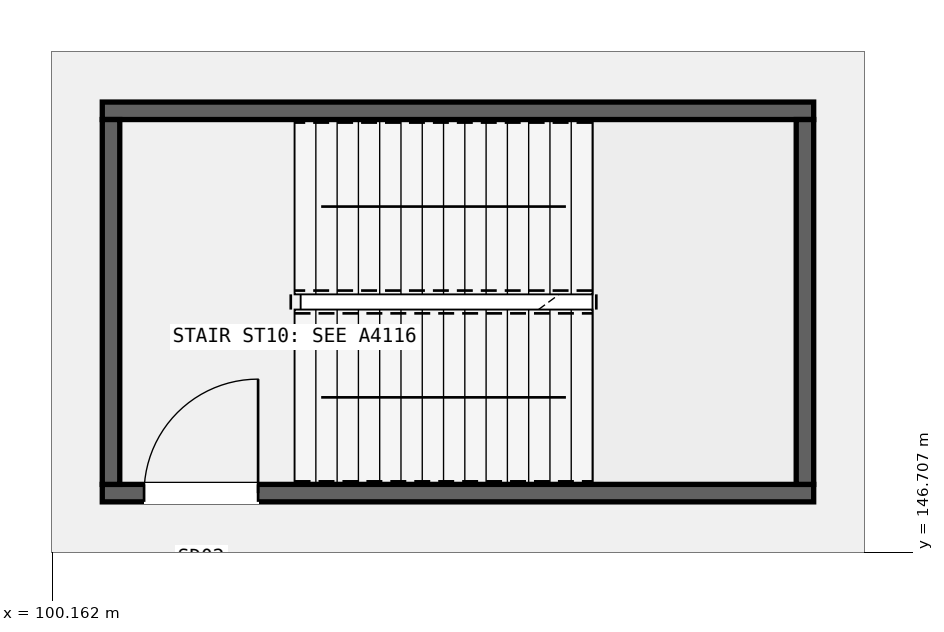
"""IFC4 building model, lengths in metres.
Left out: names, types, materials, properties, quantities, classifications, styles, units other than length and angle.
Written with IfcOpenShell. Run it as: python <this file> out.ifc"""

import sys

from ifc_helpers import new_model, si_unit, direction, frame, frame_2d, origin, place, context, subcontext, project, spatial, rectangle, extrude, element, fill, save


model = new_model("IFC4")
c1 = context("Model", 3, precision=1e-05, world=origin(), true_north=direction((0.0, 1.0)))
c2 = subcontext(c1, "Body", "Model", "MODEL_VIEW")
j1 = project(units=[si_unit("LENGTHUNIT", "METRE"), si_unit("PLANEANGLEUNIT", "RADIAN")], contexts=[c1])
p1 = place(None, origin())
s1 = spatial("IfcSite", under=j1, at=p1, CompositionType="ELEMENT")
p2 = place(p1, origin())
s2 = spatial("IfcBuilding", under=s1, at=p2, CompositionType="ELEMENT")
p3 = place(p2, frame((0.0, 0.0, 15.3)))
s3 = spatial("IfcBuildingStorey", under=s2, at=p3, CompositionType="ELEMENT", Elevation=15.3)
p4 = place(p3, frame((100.82, 147.485, 0.0), z_axis=(0.0, 0.0, 1.0), x_axis=(1.0, 0.0, 0.0)))
e1 = element("IfcWall", 1, at=p4, inside=s3, PredefinedType="SHEAR", context=c2, shape_type="SweptSolid", body=[
    extrude(rectangle(XDim=9.36, YDim=0.23, at=frame_2d((4.68, 0.0))), origin(), (0.0, 0.0, 1.0), 4.86),
])
p5 = place(p4, frame((0.55, 0.0, 0.0)))
e2 = element("IfcOpeningElement", 2, at=p5, cuts=e1, PredefinedType="OPENING", context=c2, shape_type="SweptSolid", body=[
    extrude(rectangle(XDim=1.5, YDim=2.2, at=frame_2d((0.75, 1.1))), frame((0.0, 0.125, 0.0), z_axis=(0.0, -1.0, 0.0), x_axis=(1.0, 0.0, 0.0)), (0.0, 0.0, 1.0), 0.25),
])
p6 = place(p3, frame((100.82, 152.515, 0.0), z_axis=(0.0, 0.0, 1.0), x_axis=(1.0, 0.0, 0.0)))
e3 = element("IfcWall", 3, at=p6, inside=s3, PredefinedType="SHEAR", context=c2, shape_type="SweptSolid", body=[
    extrude(rectangle(XDim=9.36, YDim=0.23, at=frame_2d((4.68, 0.0))), origin(), (0.0, 0.0, 1.0), 4.86),
])
for number, where, z_axis, x_axis in (
    (4, (100.935, 147.6, 0.0), (0.0, 0.0, 1.0), (0.0, 1.0, 0.0)),
    (5, (110.065, 147.6, 0.0), (0.0, 0.0, 1.0), (0.0, 1.0, 0.0)),
):
    element("IfcWall", number, at=place(p3, frame(where, z_axis=z_axis, x_axis=x_axis)), inside=s3, PredefinedType="SHEAR", context=c2, shape_type="SweptSolid", body=[
        extrude(rectangle(XDim=4.8, YDim=0.23, at=frame_2d((2.4, 0.0))), origin(), (0.0, 0.0, 1.0), 4.86),
    ])
p7 = place(p5, origin())
e6 = element("IfcDoor", 6, at=p7, inside=s3, OperationType="SINGLE_SWING_RIGHT", PredefinedType="DOOR", context=c2, shape_type="SweptSolid", body=[
    extrude(rectangle(XDim=1.5, YDim=2.2, at=frame_2d((0.75, 1.1))), frame((0.0, 0.025, 0.0), z_axis=(0.0, -1.0, 0.0), x_axis=(1.0, 0.0, 0.0)), (0.0, 0.0, 1.0), 0.05),
])
fill(e2, e6)
save(model, sys.argv[1])
